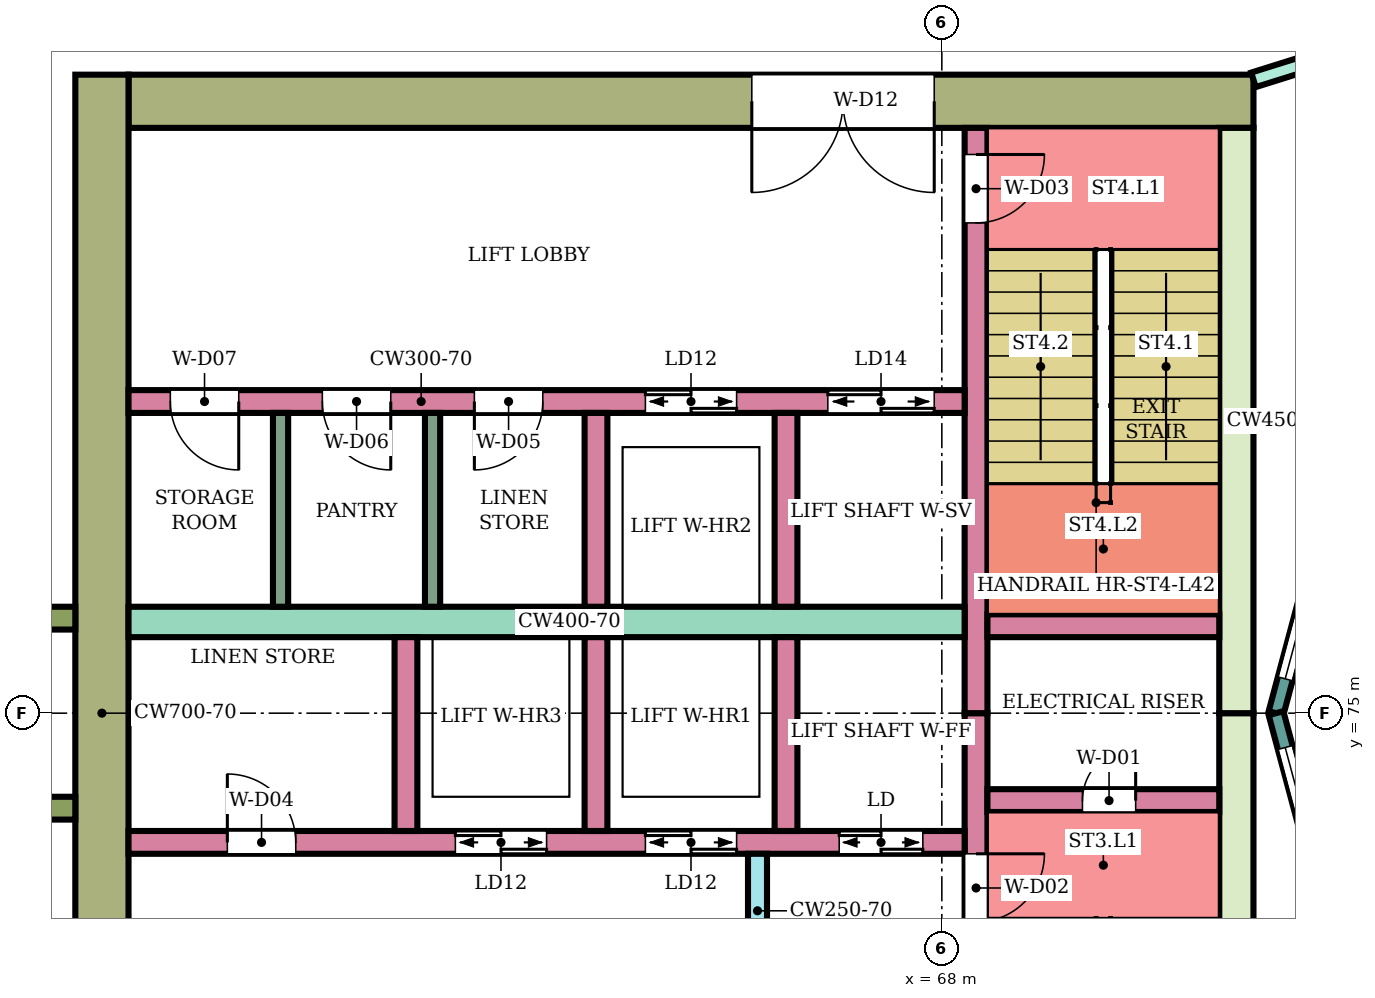
"""IFC4 building model, lengths in metres.
Left out: names, types, materials, properties, quantities, classifications, styles, units other than length and angle.
Written with IfcOpenShell. Run it as: python <this file> out.ifc"""

import sys

from ifc_helpers import new_model, si_unit, direction, frame, frame_2d, origin, place, context, subcontext, project, spatial, rectangle, extrude, element, fill, save


model = new_model("IFC4")
c1 = context("Model", 3, precision=1e-05, world=origin(), true_north=direction((0.0, 1.0)))
c2 = subcontext(c1, "Body", "Model", "MODEL_VIEW")
j1 = project(units=[si_unit("LENGTHUNIT", "METRE"), si_unit("PLANEANGLEUNIT", "RADIAN")], contexts=[c1])
p1 = place(None, origin())
s1 = spatial("IfcSite", under=j1, at=p1, CompositionType="ELEMENT")
p2 = place(p1, origin())
s2 = spatial("IfcBuilding", under=s1, at=p2, CompositionType="ELEMENT")
p3 = place(p2, frame((0.0, 0.0, 182.3)))
s3 = spatial("IfcBuildingStorey", under=s2, at=p3, CompositionType="ELEMENT", Elevation=182.3)
p4 = place(p3, frame((72.1, 83.05, 0.0), z_axis=(0.0, 0.0, 1.0), x_axis=(-1.0, 0.0, 0.0)))
e1 = element("IfcWall", 1, at=p4, inside=s3, PredefinedType="SHEAR", context=c2, shape_type="SweptSolid", body=[
    extrude(rectangle(XDim=14.8, YDim=0.7, at=frame_2d((7.4, 0.0))), origin(), (0.0, 0.0, 1.0), 3.78),
])
p5 = place(p4, frame((4.2, 0.0, 0.0)))
e2 = element("IfcOpeningElement", 2, at=p5, cuts=e1, PredefinedType="OPENING", context=c2, shape_type="SweptSolid", body=[
    extrude(rectangle(XDim=2.4, YDim=2.4, at=frame_2d((1.2, 1.2))), frame((0.0, 0.36, 0.0), z_axis=(0.0, -1.0, 0.0), x_axis=(1.0, 0.0, 0.0)), (0.0, 0.0, 1.0), 0.72),
])
for number, where, z_axis, x_axis in (
    (3, (71.875, 75.0, 0.0), (0.0, 0.0, 1.0), (0.0, -1.0, 0.0)),
    (4, (71.875, 82.7, 0.0), (0.0, 0.0, 1.0), (0.0, -1.0, 0.0)),
):
    element("IfcWall", number, at=place(p3, frame(where, z_axis=z_axis, x_axis=x_axis)), inside=s3, PredefinedType="SHEAR", context=c2, shape_type="SweptSolid", body=[
        extrude(rectangle(XDim=7.7, YDim=0.45, at=frame_2d((3.85, 0.0))), origin(), (0.0, 0.0, 1.0), 3.78),
    ])
p6 = place(p3, frame((56.95, 83.4, 0.0), z_axis=(0.0, 0.0, 1.0), x_axis=(0.0, -1.0, 0.0)))
e5 = element("IfcWall", 5, at=p6, inside=s3, PredefinedType="SHEAR", context=c2, shape_type="SweptSolid", body=[
    extrude(rectangle(XDim=16.8, YDim=0.7, at=frame_2d((8.4, 0.0))), origin(), (0.0, 0.0, 1.0), 3.78),
])
p7 = place(p3, frame((68.45, 75.0, 0.0), z_axis=(0.0, 0.0, 1.0), x_axis=(0.0, -1.0, 0.0)))
e6 = element("IfcWall", 6, at=p7, inside=s3, PredefinedType="SHEAR", context=c2, shape_type="SweptSolid", body=[
    extrude(rectangle(XDim=7.7, YDim=0.3, at=frame_2d((3.85, 0.0))), origin(), (0.0, 0.0, 1.0), 3.78),
])
p8 = place(p7, frame((1.85, 0.0, 0.0)))
e7 = element("IfcOpeningElement", 7, at=p8, cuts=e6, PredefinedType="OPENING", context=c2, shape_type="SweptSolid", body=[
    extrude(rectangle(XDim=0.9, YDim=2.1, at=frame_2d((0.45, 1.05))), frame((0.0, 0.16, 0.0), z_axis=(0.0, -1.0, 0.0), x_axis=(1.0, 0.0, 0.0)), (0.0, 0.0, 1.0), 0.32),
])
p9 = place(p3, frame((68.45, 82.7, 0.0), z_axis=(0.0, 0.0, 1.0), x_axis=(0.0, -1.0, 0.0)))
e8 = element("IfcWall", 8, at=p9, inside=s3, PredefinedType="SHEAR", context=c2, shape_type="SweptSolid", body=[
    extrude(rectangle(XDim=7.7, YDim=0.3, at=frame_2d((3.85, 0.0))), origin(), (0.0, 0.0, 1.0), 3.78),
])
p10 = place(p9, frame((0.35, 0.0, 0.0)))
e9 = element("IfcOpeningElement", 9, at=p10, cuts=e8, PredefinedType="OPENING", context=c2, shape_type="SweptSolid", body=[
    extrude(rectangle(XDim=0.9, YDim=2.1, at=frame_2d((0.45, 1.05))), frame((0.0, 0.16, 0.0), z_axis=(0.0, -1.0, 0.0), x_axis=(1.0, 0.0, 0.0)), (0.0, 0.0, 1.0), 0.32),
])
p11 = place(p3, frame((71.65, 73.85, 0.0), z_axis=(0.0, 0.0, 1.0), x_axis=(-1.0, 0.0, 0.0)))
e10 = element("IfcWall", 10, at=p11, inside=s3, PredefinedType="SHEAR", context=c2, shape_type="SweptSolid", body=[
    extrude(rectangle(XDim=3.05, YDim=0.3, at=frame_2d((1.525, 0.0))), origin(), (0.0, 0.0, 1.0), 3.78),
])
p12 = place(p11, frame((1.1, 0.0, 0.0)))
e11 = element("IfcOpeningElement", 11, at=p12, cuts=e10, PredefinedType="OPENING", context=c2, shape_type="SweptSolid", body=[
    extrude(rectangle(XDim=0.7, YDim=2.0, at=frame_2d((0.35, 1.0))), frame((0.0, 0.16, 0.0), z_axis=(0.0, -1.0, 0.0), x_axis=(1.0, 0.0, 0.0)), (0.0, 0.0, 1.0), 0.32),
])
p13 = place(p3, frame((71.65, 76.15, 0.0), z_axis=(0.0, 0.0, 1.0), x_axis=(-1.0, 0.0, 0.0)))
e12 = element("IfcWall", 12, at=p13, inside=s3, PredefinedType="SHEAR", context=c2, shape_type="SweptSolid", body=[
    extrude(rectangle(XDim=3.05, YDim=0.3, at=frame_2d((1.525, 0.0))), origin(), (0.0, 0.0, 1.0), 3.78),
])
p14 = place(p3, frame((68.3, 73.3, 0.0), z_axis=(0.0, 0.0, 1.0), x_axis=(-1.0, 0.0, 0.0)))
e13 = element("IfcWall", 13, at=p14, inside=s3, PredefinedType="SHEAR", context=c2, shape_type="SweptSolid", body=[
    extrude(rectangle(XDim=11.0, YDim=0.3, at=frame_2d((5.5, 0.0))), origin(), (0.0, 0.0, 1.0), 3.78),
])
p15 = place(p14, frame((0.55, 0.0, 0.0)))
e14 = element("IfcOpeningElement", 14, at=p15, cuts=e13, PredefinedType="OPENING", context=c2, shape_type="SweptSolid", body=[
    extrude(rectangle(XDim=1.1, YDim=2.1, at=frame_2d((0.55, 1.05))), frame((0.0, 0.16, 0.0), z_axis=(0.0, -1.0, 0.0), x_axis=(1.0, 0.0, 0.0)), (0.0, 0.0, 1.0), 0.32),
])
p16 = place(p14, frame((3.0, 0.0, 0.0)))
e15 = element("IfcOpeningElement", 15, at=p16, cuts=e13, PredefinedType="OPENING", context=c2, shape_type="SweptSolid", body=[
    extrude(rectangle(XDim=1.2, YDim=2.1, at=frame_2d((0.6, 1.05))), frame((0.0, 0.16, 0.0), z_axis=(0.0, -1.0, 0.0), x_axis=(1.0, 0.0, 0.0)), (0.0, 0.0, 1.0), 0.32),
])
p17 = place(p14, frame((5.5, 0.0, 0.0)))
e16 = element("IfcOpeningElement", 16, at=p17, cuts=e13, PredefinedType="OPENING", context=c2, shape_type="SweptSolid", body=[
    extrude(rectangle(XDim=1.2, YDim=2.1, at=frame_2d((0.6, 1.05))), frame((0.0, 0.16, 0.0), z_axis=(0.0, -1.0, 0.0), x_axis=(1.0, 0.0, 0.0)), (0.0, 0.0, 1.0), 0.32),
])
p18 = place(p14, frame((8.8, 0.0, 0.0)))
e17 = element("IfcOpeningElement", 17, at=p18, cuts=e13, PredefinedType="OPENING", context=c2, shape_type="SweptSolid", body=[
    extrude(rectangle(XDim=0.9, YDim=2.1, at=frame_2d((0.45, 1.05))), frame((0.0, 0.16, 0.0), z_axis=(0.0, -1.0, 0.0), x_axis=(1.0, 0.0, 0.0)), (0.0, 0.0, 1.0), 0.32),
])
p19 = place(p3, frame((68.3, 76.2, 0.0), z_axis=(0.0, 0.0, 1.0), x_axis=(-1.0, 0.0, 0.0)))
e18 = element("IfcWall", 18, at=p19, inside=s3, PredefinedType="SHEAR", context=c2, shape_type="SweptSolid", body=[
    extrude(rectangle(XDim=11.0, YDim=0.4, at=frame_2d((5.5, 0.0))), origin(), (0.0, 0.0, 1.0), 3.78),
])
p20 = place(p3, frame((68.3, 79.1, 0.0), z_axis=(0.0, 0.0, 1.0), x_axis=(-1.0, 0.0, 0.0)))
e19 = element("IfcWall", 19, at=p20, inside=s3, PredefinedType="SHEAR", context=c2, shape_type="SweptSolid", body=[
    extrude(rectangle(XDim=11.0, YDim=0.3, at=frame_2d((5.5, 0.0))), origin(), (0.0, 0.0, 1.0), 3.78),
])
p21 = place(p20, frame((0.4, 0.0, 0.0)))
e20 = element("IfcOpeningElement", 20, at=p21, cuts=e19, PredefinedType="OPENING", context=c2, shape_type="SweptSolid", body=[
    extrude(rectangle(XDim=1.4, YDim=2.1, at=frame_2d((0.7, 1.05))), frame((0.0, 0.16, 0.0), z_axis=(0.0, -1.0, 0.0), x_axis=(1.0, 0.0, 0.0)), (0.0, 0.0, 1.0), 0.32),
])
p22 = place(p20, frame((3.0, 0.0, 0.0)))
e21 = element("IfcOpeningElement", 21, at=p22, cuts=e19, PredefinedType="OPENING", context=c2, shape_type="SweptSolid", body=[
    extrude(rectangle(XDim=1.2, YDim=2.1, at=frame_2d((0.6, 1.05))), frame((0.0, 0.16, 0.0), z_axis=(0.0, -1.0, 0.0), x_axis=(1.0, 0.0, 0.0)), (0.0, 0.0, 1.0), 0.32),
])
p23 = place(p20, frame((5.55, 0.0, 0.0)))
e22 = element("IfcOpeningElement", 22, at=p23, cuts=e19, PredefinedType="OPENING", context=c2, shape_type="SweptSolid", body=[
    extrude(rectangle(XDim=0.9, YDim=2.1, at=frame_2d((0.45, 1.05))), frame((0.0, 0.16, 0.0), z_axis=(0.0, -1.0, 0.0), x_axis=(1.0, 0.0, 0.0)), (0.0, 0.0, 1.0), 0.32),
])
p24 = place(p20, frame((7.55, 0.0, 0.0)))
e23 = element("IfcOpeningElement", 23, at=p24, cuts=e19, PredefinedType="OPENING", context=c2, shape_type="SweptSolid", body=[
    extrude(rectangle(XDim=0.9, YDim=2.1, at=frame_2d((0.45, 1.05))), frame((0.0, 0.16, 0.0), z_axis=(0.0, -1.0, 0.0), x_axis=(1.0, 0.0, 0.0)), (0.0, 0.0, 1.0), 0.32),
])
p25 = place(p20, frame((9.55, 0.0, 0.0)))
e24 = element("IfcOpeningElement", 24, at=p25, cuts=e19, PredefinedType="OPENING", context=c2, shape_type="SweptSolid", body=[
    extrude(rectangle(XDim=0.9, YDim=2.1, at=frame_2d((0.45, 1.05))), frame((0.0, 0.16, 0.0), z_axis=(0.0, -1.0, 0.0), x_axis=(1.0, 0.0, 0.0)), (0.0, 0.0, 1.0), 0.32),
])
for number, where, z_axis, x_axis in (
    (25, (65.95, 76.0, 0.0), (0.0, 0.0, 1.0), (0.0, -1.0, 0.0)),
    (26, (63.45, 76.0, 0.0), (0.0, 0.0, 1.0), (0.0, -1.0, 0.0)),
    (27, (60.95, 76.0, 0.0), (0.0, 0.0, 1.0), (0.0, -1.0, 0.0)),
    (28, (65.95, 78.95, 0.0), (0.0, 0.0, 1.0), (0.0, -1.0, 0.0)),
    (29, (63.45, 78.95, 0.0), (0.0, 0.0, 1.0), (0.0, -1.0, 0.0)),
):
    element("IfcWall", number, at=place(p3, frame(where, z_axis=z_axis, x_axis=x_axis)), inside=s3, PredefinedType="SHEAR", context=c2, shape_type="SweptSolid", body=[
        extrude(rectangle(XDim=2.55, YDim=0.3, at=frame_2d((1.275, 0.0))), origin(), (0.0, 0.0, 1.0), 3.78),
    ])
p26 = place(p3, frame((65.575, 73.15, 0.0), z_axis=(0.0, 0.0, 1.0), x_axis=(0.0, -1.0, 0.0)))
e30 = element("IfcWall", 30, at=p26, inside=s3, PredefinedType="SHEAR", context=c2, shape_type="SweptSolid", body=[
    extrude(rectangle(XDim=1.5, YDim=0.25, at=frame_2d((0.75, 0.0))), origin(), (0.0, 0.0, 1.0), 3.78),
])
for number, where, z_axis, x_axis in (
    (31, (56.6, 76.25, 0.0), (0.0, 0.0, 1.0), (-1.0, 0.0, 0.0)),
    (32, (56.6, 73.75, 0.0), (0.0, 0.0, 1.0), (-1.0, 0.0, 0.0)),
):
    element("IfcWall", number, at=place(p3, frame(where, z_axis=z_axis, x_axis=x_axis)), inside=s3, PredefinedType="NOTDEFINED", context=c2, shape_type="SweptSolid", body=[
        extrude(rectangle(XDim=2.416, YDim=0.3, at=frame_2d((1.208, 0.0))), origin(), (0.0, 0.0, 1.0), 4.1),
    ])
p27 = place(p3, frame((73.415, 78.802, 0.0), z_axis=(0.0, 0.0, 1.0), x_axis=(-0.258789828301, -0.965933654434, 0.0)))
e33 = element("IfcWall", 33, at=p27, inside=s3, PredefinedType="NOTDEFINED", context=c2, shape_type="SweptSolid", body=[
    extrude(rectangle(XDim=3.936, YDim=0.2, at=frame_2d((1.968, 0.0))), origin(), (0.0, 0.0, 1.0), 4.1),
])
p28 = place(p27, frame((0.468, 0.0, 0.9)))
e34 = element("IfcOpeningElement", 34, at=p28, cuts=e33, PredefinedType="OPENING", context=c2, shape_type="SweptSolid", body=[
    extrude(rectangle(XDim=3.0, YDim=2.3, at=frame_2d((1.5, 1.15))), frame((0.0, 0.11, 0.0), z_axis=(0.0, -1.0, 0.0), x_axis=(1.0, 0.0, 0.0)), (0.0, 0.0, 1.0), 0.22),
])
p29 = place(p3, frame((72.396, 75.0, 0.0), z_axis=(0.0, 0.0, 1.0), x_axis=(0.258789828301, -0.965933654434, 0.0)))
e35 = element("IfcWall", 35, at=p29, inside=s3, PredefinedType="NOTDEFINED", context=c2, shape_type="SweptSolid", body=[
    extrude(rectangle(XDim=3.936, YDim=0.2, at=frame_2d((1.968, 0.0))), origin(), (0.0, 0.0, 1.0), 4.1),
])
p30 = place(p29, frame((0.468, 0.0, 0.9)))
e36 = element("IfcOpeningElement", 36, at=p30, cuts=e35, PredefinedType="OPENING", context=c2, shape_type="SweptSolid", body=[
    extrude(rectangle(XDim=3.0, YDim=2.3, at=frame_2d((1.5, 1.15))), frame((0.0, 0.11, 0.0), z_axis=(0.0, -1.0, 0.0), x_axis=(1.0, 0.0, 0.0)), (0.0, 0.0, 1.0), 0.22),
])
p31 = place(p3, frame((72.1, 83.332, 0.0), z_axis=(0.0, 0.0, 1.0), x_axis=(0.954233106619, 0.299063836383, 0.0)))
e37 = element("IfcWall", 37, at=p31, inside=s3, PredefinedType="PARTITIONING", context=c2, shape_type="SweptSolid", body=[
    extrude(rectangle(XDim=2.414, YDim=0.2, at=frame_2d((1.207, 0.0))), origin(), (0.0, 0.0, 1.0), 3.65),
])
p32 = place(p31, frame((0.762, 0.0, 0.0)))
e38 = element("IfcOpeningElement", 38, at=p32, cuts=e37, PredefinedType="OPENING", context=c2, shape_type="SweptSolid", body=[
    extrude(rectangle(XDim=0.9, YDim=2.1, at=frame_2d((0.45, 1.05))), frame((0.0, 0.11, 0.0), z_axis=(0.0, -1.0, 0.0), x_axis=(1.0, 0.0, 0.0)), (0.0, 0.0, 1.0), 0.22),
])
for number, where, z_axis, x_axis in (
    (39, (61.3, 78.95, 0.0), (0.0, 0.0, 1.0), (0.0, -1.0, 0.0)),
    (40, (59.3, 78.95, 0.0), (0.0, 0.0, 1.0), (0.0, -1.0, 0.0)),
):
    element("IfcWall", number, at=place(p3, frame(where, z_axis=z_axis, x_axis=x_axis)), inside=s3, PredefinedType="PARTITIONING", context=c2, shape_type="SweptSolid", body=[
        extrude(rectangle(XDim=2.55, YDim=0.2, at=frame_2d((1.275, 0.0))), origin(), (0.0, 0.0, 1.0), 3.78),
    ])
p33 = place(p28, origin())
e41 = element("IfcWindow", 41, at=p33, inside=s3, PartitioningType="SINGLE_PANEL", PredefinedType="WINDOW", context=c2, shape_type="SweptSolid", body=[
    extrude(rectangle(XDim=3.0, YDim=2.3, at=frame_2d((1.5, 1.15))), frame((0.0, 0.03, 0.0), z_axis=(0.0, -1.0, 0.0), x_axis=(1.0, 0.0, 0.0)), (0.0, 0.0, 1.0), 0.06),
])
fill(e34, e41)
p34 = place(p30, origin())
e42 = element("IfcWindow", 42, at=p34, inside=s3, PartitioningType="SINGLE_PANEL", PredefinedType="WINDOW", context=c2, shape_type="SweptSolid", body=[
    extrude(rectangle(XDim=3.0, YDim=2.3, at=frame_2d((1.5, 1.15))), frame((0.0, 0.03, 0.0), z_axis=(0.0, -1.0, 0.0), x_axis=(1.0, 0.0, 0.0)), (0.0, 0.0, 1.0), 0.06),
])
fill(e36, e42)
p35 = place(p12, frame((0.7, 0.0, 0.0), z_axis=(0.0, 0.0, 1.0), x_axis=(-1.0, 0.0, 0.0)))
e43 = element("IfcDoor", 43, at=p35, inside=s3, OperationType="SINGLE_SWING_RIGHT", PredefinedType="DOOR", context=c2, shape_type="SweptSolid", body=[
    extrude(rectangle(XDim=0.7, YDim=2.0, at=frame_2d((0.35, 1.0))), frame((0.0, 0.025, 0.0), z_axis=(0.0, -1.0, 0.0), x_axis=(1.0, 0.0, 0.0)), (0.0, 0.0, 1.0), 0.05),
])
fill(e11, e43)
p36 = place(p8, origin())
e44 = element("IfcDoor", 44, at=p36, inside=s3, OperationType="SINGLE_SWING_LEFT", PredefinedType="DOOR", context=c2, shape_type="SweptSolid", body=[
    extrude(rectangle(XDim=0.9, YDim=2.1, at=frame_2d((0.45, 1.05))), frame((0.0, 0.025, 0.0), z_axis=(0.0, -1.0, 0.0), x_axis=(1.0, 0.0, 0.0)), (0.0, 0.0, 1.0), 0.05),
])
fill(e7, e44)
p37 = place(p10, origin())
e45 = element("IfcDoor", 45, at=p37, inside=s3, OperationType="SINGLE_SWING_LEFT", PredefinedType="DOOR", context=c2, shape_type="SweptSolid", body=[
    extrude(rectangle(XDim=0.9, YDim=2.1, at=frame_2d((0.45, 1.05))), frame((0.0, 0.025, 0.0), z_axis=(0.0, -1.0, 0.0), x_axis=(1.0, 0.0, 0.0)), (0.0, 0.0, 1.0), 0.05),
])
fill(e9, e45)
p38 = place(p15, origin())
e46 = element("IfcDoor", 46, at=p38, inside=s3, OperationType="DOUBLE_DOOR_SLIDING", PredefinedType="DOOR", context=c2, shape_type="SweptSolid", body=[
    extrude(rectangle(XDim=1.1, YDim=2.1, at=frame_2d((0.55, 1.05))), frame((0.0, 0.025, 0.0), z_axis=(0.0, -1.0, 0.0), x_axis=(1.0, 0.0, 0.0)), (0.0, 0.0, 1.0), 0.05),
])
fill(e14, e46)
p39 = place(p16, origin())
e47 = element("IfcDoor", 47, at=p39, inside=s3, OperationType="DOUBLE_DOOR_SLIDING", PredefinedType="DOOR", context=c2, shape_type="SweptSolid", body=[
    extrude(rectangle(XDim=1.2, YDim=2.1, at=frame_2d((0.6, 1.05))), frame((0.0, 0.025, 0.0), z_axis=(0.0, -1.0, 0.0), x_axis=(1.0, 0.0, 0.0)), (0.0, 0.0, 1.0), 0.05),
])
fill(e15, e47)
p40 = place(p17, origin())
e48 = element("IfcDoor", 48, at=p40, inside=s3, OperationType="DOUBLE_DOOR_SLIDING", PredefinedType="DOOR", context=c2, shape_type="SweptSolid", body=[
    extrude(rectangle(XDim=1.2, YDim=2.1, at=frame_2d((0.6, 1.05))), frame((0.0, 0.025, 0.0), z_axis=(0.0, -1.0, 0.0), x_axis=(1.0, 0.0, 0.0)), (0.0, 0.0, 1.0), 0.05),
])
fill(e16, e48)
p41 = place(p18, frame((0.9, 0.0, 0.0), z_axis=(0.0, 0.0, 1.0), x_axis=(-1.0, 0.0, 0.0)))
e49 = element("IfcDoor", 49, at=p41, inside=s3, OperationType="SINGLE_SWING_LEFT", PredefinedType="DOOR", context=c2, shape_type="SweptSolid", body=[
    extrude(rectangle(XDim=0.9, YDim=2.1, at=frame_2d((0.45, 1.05))), frame((0.0, 0.025, 0.0), z_axis=(0.0, -1.0, 0.0), x_axis=(1.0, 0.0, 0.0)), (0.0, 0.0, 1.0), 0.05),
])
fill(e17, e49)
p42 = place(p21, origin())
e50 = element("IfcDoor", 50, at=p42, inside=s3, OperationType="DOUBLE_DOOR_SLIDING", PredefinedType="DOOR", context=c2, shape_type="SweptSolid", body=[
    extrude(rectangle(XDim=1.4, YDim=2.1, at=frame_2d((0.7, 1.05))), frame((0.0, 0.025, 0.0), z_axis=(0.0, -1.0, 0.0), x_axis=(1.0, 0.0, 0.0)), (0.0, 0.0, 1.0), 0.05),
])
fill(e20, e50)
p43 = place(p22, origin())
e51 = element("IfcDoor", 51, at=p43, inside=s3, OperationType="DOUBLE_DOOR_SLIDING", PredefinedType="DOOR", context=c2, shape_type="SweptSolid", body=[
    extrude(rectangle(XDim=1.2, YDim=2.1, at=frame_2d((0.6, 1.05))), frame((0.0, 0.025, 0.0), z_axis=(0.0, -1.0, 0.0), x_axis=(1.0, 0.0, 0.0)), (0.0, 0.0, 1.0), 0.05),
])
fill(e21, e51)
p44 = place(p23, origin())
e52 = element("IfcDoor", 52, at=p44, inside=s3, OperationType="SINGLE_SWING_RIGHT", PredefinedType="DOOR", context=c2, shape_type="SweptSolid", body=[
    extrude(rectangle(XDim=0.9, YDim=2.1, at=frame_2d((0.45, 1.05))), frame((0.0, 0.025, 0.0), z_axis=(0.0, -1.0, 0.0), x_axis=(1.0, 0.0, 0.0)), (0.0, 0.0, 1.0), 0.05),
])
fill(e22, e52)
p45 = place(p24, origin())
e53 = element("IfcDoor", 53, at=p45, inside=s3, OperationType="SINGLE_SWING_LEFT", PredefinedType="DOOR", context=c2, shape_type="SweptSolid", body=[
    extrude(rectangle(XDim=0.9, YDim=2.1, at=frame_2d((0.45, 1.05))), frame((0.0, 0.025, 0.0), z_axis=(0.0, -1.0, 0.0), x_axis=(1.0, 0.0, 0.0)), (0.0, 0.0, 1.0), 0.05),
])
fill(e23, e53)
p46 = place(p25, origin())
e54 = element("IfcDoor", 54, at=p46, inside=s3, OperationType="SINGLE_SWING_LEFT", PredefinedType="DOOR", context=c2, shape_type="SweptSolid", body=[
    extrude(rectangle(XDim=0.9, YDim=2.1, at=frame_2d((0.45, 1.05))), frame((0.0, 0.025, 0.0), z_axis=(0.0, -1.0, 0.0), x_axis=(1.0, 0.0, 0.0)), (0.0, 0.0, 1.0), 0.05),
])
fill(e24, e54)
p47 = place(p5, origin())
e55 = element("IfcDoor", 55, at=p47, inside=s3, OperationType="DOUBLE_DOOR_SINGLE_SWING", PredefinedType="DOOR", context=c2, shape_type="SweptSolid", body=[
    extrude(rectangle(XDim=2.4, YDim=2.4, at=frame_2d((1.2, 1.2))), frame((0.0, 0.025, 0.0), z_axis=(0.0, -1.0, 0.0), x_axis=(1.0, 0.0, 0.0)), (0.0, 0.0, 1.0), 0.05),
])
fill(e2, e55)
save(model, sys.argv[1])
